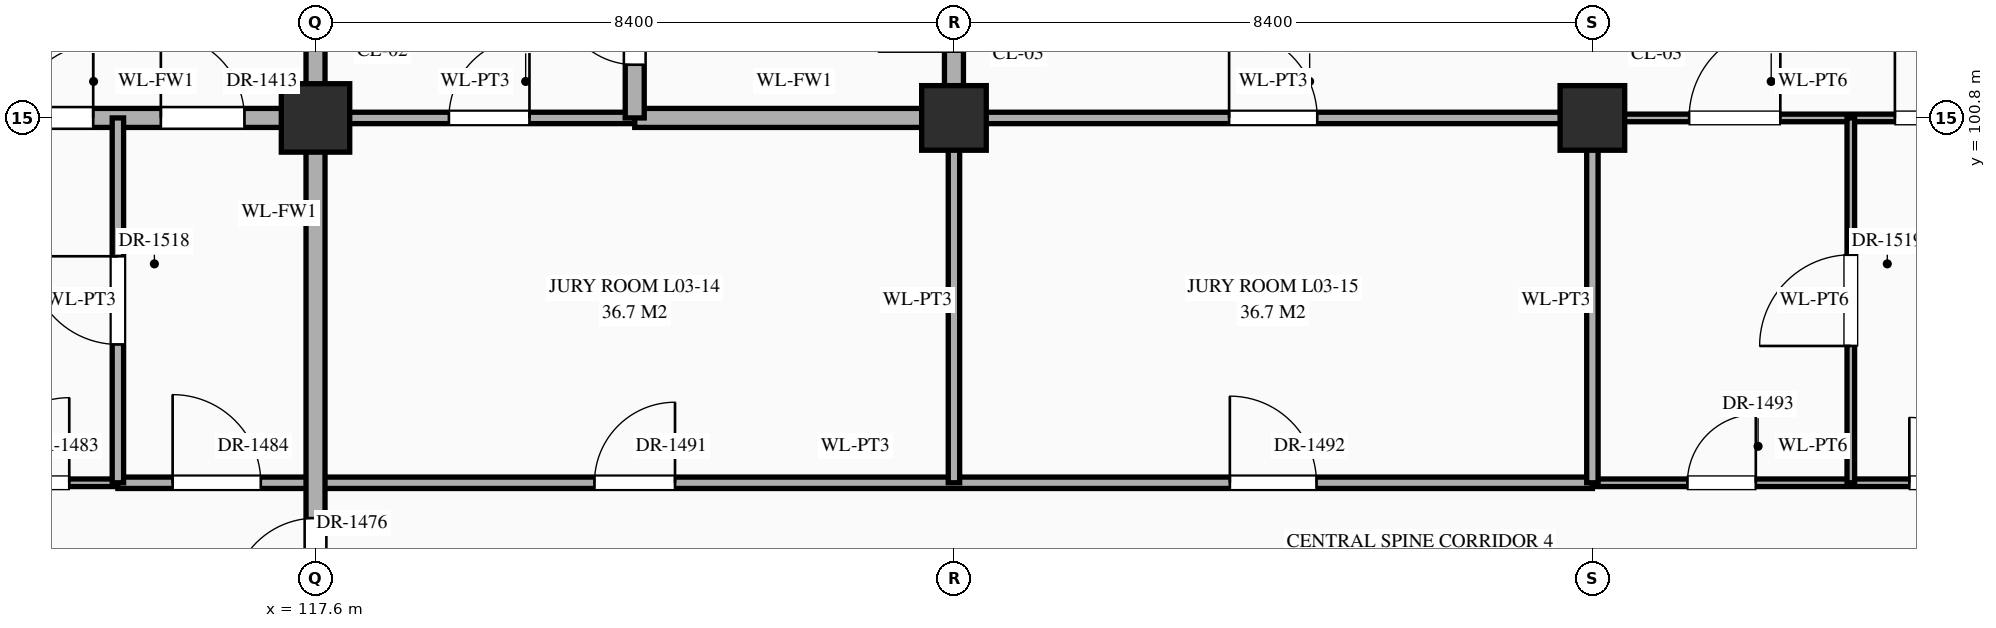
"""IFC4 building model, lengths in metres.
Left out: names, types, materials, properties, quantities, classifications, styles, units other than length and angle.
Written with IfcOpenShell. Run it as: python <this file> out.ifc"""

import sys

from ifc_helpers import new_model, si_unit, direction, frame, frame_2d, origin, origin_2d, place, context, subcontext, project, spatial, rectangle, extrude, element, fill, save


model = new_model("IFC4")
c1 = context("Model", 3, precision=1e-05, world=origin(), true_north=direction((0.0, 1.0)))
c2 = subcontext(c1, "Body", "Model", "MODEL_VIEW")
j1 = project(units=[si_unit("LENGTHUNIT", "METRE"), si_unit("PLANEANGLEUNIT", "RADIAN")], contexts=[c1])
p1 = place(None, origin())
s1 = spatial("IfcSite", under=j1, at=p1, CompositionType="ELEMENT")
p2 = place(p1, origin())
s2 = spatial("IfcBuilding", under=s1, at=p2, CompositionType="ELEMENT")
p3 = place(p2, frame((0.0, 0.0, 10.8)))
s3 = spatial("IfcBuildingStorey", under=s2, at=p3, CompositionType="ELEMENT", Elevation=10.8)
p4 = place(p3, frame((117.6, 100.8, 0.0), z_axis=(0.0, 0.0, 1.0), x_axis=(1.0, 0.0, 0.0)))
e1 = element("IfcColumn", 1, at=p4, inside=s3, PredefinedType="COLUMN", context=c2, shape_type="SweptSolid", body=[
    extrude(rectangle(XDim=0.9, YDim=0.9, at=origin_2d()), origin(), (0.0, 0.0, 1.0), 5.4),
])
for number, where, z_axis, x_axis in (
    (2, (126.0, 100.8, 0.0), (0.0, 0.0, 1.0), (1.0, 0.0, 0.0)),
    (3, (134.4, 100.8, 0.0), (0.0, 0.0, 1.0), (1.0, 0.0, 0.0)),
):
    element("IfcColumn", number, at=place(p3, frame(where, z_axis=z_axis, x_axis=x_axis)), inside=s3, PredefinedType="COLUMN", context=c2, shape_type="SweptSolid", body=[
        extrude(rectangle(XDim=0.85, YDim=0.85, at=origin_2d()), origin(), (0.0, 0.0, 1.0), 5.4),
    ])
p5 = place(p3, frame((109.2, 96.0, 0.0), z_axis=(0.0, 0.0, 1.0), x_axis=(1.0, 0.0, 0.0)))
e4 = element("IfcWall", 4, at=p5, inside=s3, PredefinedType="STANDARD", context=c2, shape_type="SweptSolid", body=[
    extrude(rectangle(XDim=5.8, YDim=0.1, at=frame_2d((2.9, 0.0))), origin(), (0.0, 0.0, 1.0), 5.12),
])
p6 = place(p5, frame((1.16, 0.0, 0.0)))
e5 = element("IfcOpeningElement", 5, at=p6, cuts=e4, PredefinedType="OPENING", context=c2, shape_type="SweptSolid", body=[
    extrude(rectangle(XDim=1.08, YDim=2.25, at=frame_2d((0.54, 1.125))), frame((0.0, 0.062, 0.0), z_axis=(0.0, -1.0, 0.0), x_axis=(1.0, 0.0, 0.0)), (0.0, 0.0, 1.0), 0.124),
])
p7 = place(p5, frame((4.04, 0.0, 0.0)))
e6 = element("IfcOpeningElement", 6, at=p7, cuts=e4, PredefinedType="OPENING", context=c2, shape_type="SweptSolid", body=[
    extrude(rectangle(XDim=1.12, YDim=2.25, at=frame_2d((0.56, 1.125))), frame((0.0, 0.062, 0.0), z_axis=(0.0, -1.0, 0.0), x_axis=(1.0, 0.0, 0.0)), (0.0, 0.0, 1.0), 0.124),
])
p8 = place(p3, frame((115.0, 96.0, 0.0), z_axis=(0.0, 0.0, 1.0), x_axis=(1.0, 0.0, 0.0)))
e7 = element("IfcWall", 7, at=p8, inside=s3, PredefinedType="STANDARD", context=c2, shape_type="SweptSolid", body=[
    extrude(rectangle(XDim=19.4, YDim=0.15, at=frame_2d((9.7, 0.0))), origin(), (0.0, 0.0, 1.0), 5.12),
])
p9 = place(p8, frame((0.72, 0.0, 0.0)))
e8 = element("IfcOpeningElement", 8, at=p9, cuts=e7, PredefinedType="OPENING", context=c2, shape_type="SweptSolid", body=[
    extrude(rectangle(XDim=1.16, YDim=2.3, at=frame_2d((0.58, 1.15))), frame((0.0, 0.087, 0.0), z_axis=(0.0, -1.0, 0.0), x_axis=(1.0, 0.0, 0.0)), (0.0, 0.0, 1.0), 0.174),
])
p10 = place(p8, frame((6.27, 0.0, 0.0)))
e9 = element("IfcOpeningElement", 9, at=p10, cuts=e7, PredefinedType="OPENING", context=c2, shape_type="SweptSolid", body=[
    extrude(rectangle(XDim=1.06, YDim=2.4, at=frame_2d((0.53, 1.2))), frame((0.0, 0.087, 0.0), z_axis=(0.0, -1.0, 0.0), x_axis=(1.0, 0.0, 0.0)), (0.0, 0.0, 1.0), 0.174),
])
p11 = place(p8, frame((14.63, 0.0, 0.0)))
e10 = element("IfcOpeningElement", 10, at=p11, cuts=e7, PredefinedType="OPENING", context=c2, shape_type="SweptSolid", body=[
    extrude(rectangle(XDim=1.14, YDim=2.4, at=frame_2d((0.57, 1.2))), frame((0.0, 0.087, 0.0), z_axis=(0.0, -1.0, 0.0), x_axis=(1.0, 0.0, 0.0)), (0.0, 0.0, 1.0), 0.174),
])
p12 = place(p3, frame((134.4, 96.0, 0.0), z_axis=(0.0, 0.0, 1.0), x_axis=(1.0, 0.0, 0.0)))
e11 = element("IfcWall", 11, at=p12, inside=s3, PredefinedType="STANDARD", context=c2, shape_type="SweptSolid", body=[
    extrude(rectangle(XDim=5.8, YDim=0.1, at=frame_2d((2.9, 0.0))), origin(), (0.0, 0.0, 1.0), 5.12),
])
p13 = place(p12, frame((1.25, 0.0, 0.0)))
e12 = element("IfcOpeningElement", 12, at=p13, cuts=e11, PredefinedType="OPENING", context=c2, shape_type="SweptSolid", body=[
    extrude(rectangle(XDim=0.9, YDim=2.15, at=frame_2d((0.45, 1.075))), frame((0.0, 0.062, 0.0), z_axis=(0.0, -1.0, 0.0), x_axis=(1.0, 0.0, 0.0)), (0.0, 0.0, 1.0), 0.124),
])
p14 = place(p12, frame((4.17, 0.0, 0.0)))
e13 = element("IfcOpeningElement", 13, at=p14, cuts=e11, PredefinedType="OPENING", context=c2, shape_type="SweptSolid", body=[
    extrude(rectangle(XDim=0.86, YDim=2.1, at=frame_2d((0.43, 1.05))), frame((0.0, 0.062, 0.0), z_axis=(0.0, -1.0, 0.0), x_axis=(1.0, 0.0, 0.0)), (0.0, 0.0, 1.0), 0.124),
])
p15 = place(p3, frame((113.4, 100.8, 0.0), z_axis=(0.0, 0.0, 1.0), x_axis=(1.0, 0.0, 0.0)))
e14 = element("IfcWall", 14, at=p15, inside=s3, PredefinedType="STANDARD", context=c2, shape_type="SweptSolid", body=[
    extrude(rectangle(XDim=4.2, YDim=0.25, at=frame_2d((2.1, 0.0))), origin(), (0.0, 0.0, 1.0), 4.27),
])
p16 = place(p15, frame((0.325, 0.0, 0.0)))
e15 = element("IfcOpeningElement", 15, at=p16, cuts=e14, PredefinedType="OPENING", context=c2, shape_type="SweptSolid", body=[
    extrude(rectangle(XDim=0.95, YDim=2.15, at=frame_2d((0.475, 1.075))), frame((0.0, 0.137, 0.0), z_axis=(0.0, -1.0, 0.0), x_axis=(1.0, 0.0, 0.0)), (0.0, 0.0, 1.0), 0.274),
])
p17 = place(p15, frame((2.165, 0.0, 0.0)))
e16 = element("IfcOpeningElement", 16, at=p17, cuts=e14, PredefinedType="OPENING", context=c2, shape_type="SweptSolid", body=[
    extrude(rectangle(XDim=1.1, YDim=2.2, at=frame_2d((0.55, 1.1))), frame((0.0, 0.137, 0.0), z_axis=(0.0, -1.0, 0.0), x_axis=(1.0, 0.0, 0.0)), (0.0, 0.0, 1.0), 0.274),
])
p18 = place(p3, frame((117.6, 100.8, 0.0), z_axis=(0.0, 0.0, 1.0), x_axis=(1.0, 0.0, 0.0)))
e17 = element("IfcWall", 17, at=p18, inside=s3, PredefinedType="STANDARD", context=c2, shape_type="SweptSolid", body=[
    extrude(rectangle(XDim=4.2, YDim=0.15, at=frame_2d((2.1, 0.0))), origin(), (0.0, 0.0, 1.0), 4.27),
])
p19 = place(p18, frame((1.755, 0.0, 0.0)))
e18 = element("IfcOpeningElement", 18, at=p19, cuts=e17, PredefinedType="OPENING", context=c2, shape_type="SweptSolid", body=[
    extrude(rectangle(XDim=1.06, YDim=2.4, at=frame_2d((0.53, 1.2))), frame((0.0, 0.087, 0.0), z_axis=(0.0, -1.0, 0.0), x_axis=(1.0, 0.0, 0.0)), (0.0, 0.0, 1.0), 0.174),
])
p20 = place(p3, frame((121.8, 100.8, 0.0), z_axis=(0.0, 0.0, 1.0), x_axis=(1.0, 0.0, 0.0)))
e19 = element("IfcWall", 19, at=p20, inside=s3, PredefinedType="STANDARD", context=c2, shape_type="SweptSolid", body=[
    extrude(rectangle(XDim=4.2, YDim=0.25, at=frame_2d((2.1, 0.0))), origin(), (0.0, 0.0, 1.0), 4.27),
])
p21 = place(p3, frame((126.0, 100.8, 0.0), z_axis=(0.0, 0.0, 1.0), x_axis=(1.0, 0.0, 0.0)))
e20 = element("IfcWall", 20, at=p21, inside=s3, PredefinedType="STANDARD", context=c2, shape_type="SweptSolid", body=[
    extrude(rectangle(XDim=8.4, YDim=0.15, at=frame_2d((4.2, 0.0))), origin(), (0.0, 0.0, 1.0), 4.27),
])
p22 = place(p21, frame((3.62, 0.0, 0.0)))
e21 = element("IfcOpeningElement", 21, at=p22, cuts=e20, PredefinedType="OPENING", context=c2, shape_type="SweptSolid", body=[
    extrude(rectangle(XDim=1.16, YDim=2.3, at=frame_2d((0.58, 1.15))), frame((0.0, 0.087, 0.0), z_axis=(0.0, -1.0, 0.0), x_axis=(1.0, 0.0, 0.0)), (0.0, 0.0, 1.0), 0.174),
])
p23 = place(p3, frame((134.4, 100.8, 0.0), z_axis=(0.0, 0.0, 1.0), x_axis=(1.0, 0.0, 0.0)))
e22 = element("IfcWall", 22, at=p23, inside=s3, PredefinedType="STANDARD", context=c2, shape_type="SweptSolid", body=[
    extrude(rectangle(XDim=5.8, YDim=0.1, at=frame_2d((2.9, 0.0))), origin(), (0.0, 0.0, 1.0), 4.27),
])
p24 = place(p23, frame((1.272, 0.0, 0.0)))
e23 = element("IfcOpeningElement", 23, at=p24, cuts=e22, PredefinedType="OPENING", context=c2, shape_type="SweptSolid", body=[
    extrude(rectangle(XDim=1.2, YDim=2.35, at=frame_2d((0.6, 1.175))), frame((0.0, 0.062, 0.0), z_axis=(0.0, -1.0, 0.0), x_axis=(1.0, 0.0, 0.0)), (0.0, 0.0, 1.0), 0.124),
])
p25 = place(p23, frame((3.98, 0.0, 0.0)))
e24 = element("IfcOpeningElement", 24, at=p25, cuts=e22, PredefinedType="OPENING", context=c2, shape_type="SweptSolid", body=[
    extrude(rectangle(XDim=1.24, YDim=2.3, at=frame_2d((0.62, 1.15))), frame((0.0, 0.062, 0.0), z_axis=(0.0, -1.0, 0.0), x_axis=(1.0, 0.0, 0.0)), (0.0, 0.0, 1.0), 0.124),
])
p26 = place(p3, frame((115.0, 96.0, 0.0), z_axis=(0.0, 0.0, 1.0), x_axis=(0.0, 1.0, 0.0)))
e25 = element("IfcWall", 25, at=p26, inside=s3, PredefinedType="STANDARD", context=c2, shape_type="SweptSolid", body=[
    extrude(rectangle(XDim=4.8, YDim=0.15, at=frame_2d((2.4, 0.0))), origin(), (0.0, 0.0, 1.0), 5.12),
])
p27 = place(p26, frame((1.82, 0.0, 0.0)))
e26 = element("IfcOpeningElement", 26, at=p27, cuts=e25, PredefinedType="OPENING", context=c2, shape_type="SweptSolid", body=[
    extrude(rectangle(XDim=1.16, YDim=2.3, at=frame_2d((0.58, 1.15))), frame((0.0, 0.087, 0.0), z_axis=(0.0, -1.0, 0.0), x_axis=(1.0, 0.0, 0.0)), (0.0, 0.0, 1.0), 0.174),
])
p28 = place(p3, frame((117.6, 91.2, 0.0), z_axis=(0.0, 0.0, 1.0), x_axis=(0.0, 1.0, 0.0)))
e27 = element("IfcWall", 27, at=p28, inside=s3, PredefinedType="STANDARD", context=c2, shape_type="SweptSolid", body=[
    extrude(rectangle(XDim=13.2, YDim=0.25, at=frame_2d((6.6, 0.0))), origin(), (0.0, 0.0, 1.0), 4.37),
])
p29 = place(p28, frame((0.54, 0.0, 0.0)))
e28 = element("IfcOpeningElement", 28, at=p29, cuts=e27, PredefinedType="OPENING", context=c2, shape_type="SweptSolid", body=[
    extrude(rectangle(XDim=0.95, YDim=2.15, at=frame_2d((0.475, 1.075))), frame((0.0, 0.137, 0.0), z_axis=(0.0, -1.0, 0.0), x_axis=(1.0, 0.0, 0.0)), (0.0, 0.0, 1.0), 0.274),
])
p30 = place(p28, frame((10.51, 0.0, 0.0)))
e29 = element("IfcOpeningElement", 29, at=p30, cuts=e27, PredefinedType="OPENING", context=c2, shape_type="SweptSolid", body=[
    extrude(rectangle(XDim=0.95, YDim=2.15, at=frame_2d((0.475, 1.075))), frame((0.0, 0.137, 0.0), z_axis=(0.0, -1.0, 0.0), x_axis=(1.0, 0.0, 0.0)), (0.0, 0.0, 1.0), 0.274),
])
p31 = place(p28, frame((3.235, 0.0, 0.0)))
e30 = element("IfcOpeningElement", 30, at=p31, cuts=e27, PredefinedType="OPENING", context=c2, shape_type="SweptSolid", body=[
    extrude(rectangle(XDim=1.1, YDim=2.2, at=frame_2d((0.55, 1.1))), frame((0.0, 0.137, 0.0), z_axis=(0.0, -1.0, 0.0), x_axis=(1.0, 0.0, 0.0)), (0.0, 0.0, 1.0), 0.274),
])
p32 = place(p3, frame((121.8, 100.8, 0.0), z_axis=(0.0, 0.0, 1.0), x_axis=(0.0, 1.0, 0.0)))
e31 = element("IfcWall", 31, at=p32, inside=s3, PredefinedType="STANDARD", context=c2, shape_type="SweptSolid", body=[
    extrude(rectangle(XDim=3.6, YDim=0.25, at=frame_2d((1.8, 0.0))), origin(), (0.0, 0.0, 1.0), 4.72),
])
p33 = place(p32, frame((0.7, 0.0, 0.0)))
e32 = element("IfcOpeningElement", 32, at=p33, cuts=e31, PredefinedType="OPENING", context=c2, shape_type="SweptSolid", body=[
    extrude(rectangle(XDim=1.0, YDim=2.2, at=frame_2d((0.5, 1.1))), frame((0.0, 0.137, 0.0), z_axis=(0.0, -1.0, 0.0), x_axis=(1.0, 0.0, 0.0)), (0.0, 0.0, 1.0), 0.274),
])
p34 = place(p3, frame((126.0, 96.0, 0.0), z_axis=(0.0, 0.0, 1.0), x_axis=(0.0, 1.0, 0.0)))
e33 = element("IfcWall", 33, at=p34, inside=s3, PredefinedType="STANDARD", context=c2, shape_type="SweptSolid", body=[
    extrude(rectangle(XDim=4.8, YDim=0.15, at=frame_2d((2.4, 0.0))), origin(), (0.0, 0.0, 1.0), 4.37),
])
p35 = place(p3, frame((126.0, 100.8, 0.0), z_axis=(0.0, 0.0, 1.0), x_axis=(0.0, 1.0, 0.0)))
e34 = element("IfcWall", 34, at=p35, inside=s3, PredefinedType="STANDARD", context=c2, shape_type="SweptSolid", body=[
    extrude(rectangle(XDim=3.6, YDim=0.25, at=frame_2d((1.8, 0.0))), origin(), (0.0, 0.0, 1.0), 4.37),
])
p36 = place(p35, frame((0.873, 0.0, 0.0)))
e35 = element("IfcOpeningElement", 35, at=p36, cuts=e34, PredefinedType="OPENING", context=c2, shape_type="SweptSolid", body=[
    extrude(rectangle(XDim=1.0, YDim=2.2, at=frame_2d((0.5, 1.1))), frame((0.0, 0.137, 0.0), z_axis=(0.0, -1.0, 0.0), x_axis=(1.0, 0.0, 0.0)), (0.0, 0.0, 1.0), 0.274),
])
p37 = place(p3, frame((134.4, 96.0, 0.0), z_axis=(0.0, 0.0, 1.0), x_axis=(0.0, 1.0, 0.0)))
e36 = element("IfcWall", 36, at=p37, inside=s3, PredefinedType="STANDARD", context=c2, shape_type="SweptSolid", body=[
    extrude(rectangle(XDim=4.8, YDim=0.15, at=frame_2d((2.4, 0.0))), origin(), (0.0, 0.0, 1.0), 4.37),
])
p38 = place(p3, frame((137.8, 96.0, 0.0), z_axis=(0.0, 0.0, 1.0), x_axis=(0.0, 1.0, 0.0)))
e37 = element("IfcWall", 37, at=p38, inside=s3, PredefinedType="STANDARD", context=c2, shape_type="SweptSolid", body=[
    extrude(rectangle(XDim=4.8, YDim=0.1, at=frame_2d((2.4, 0.0))), origin(), (0.0, 0.0, 1.0), 5.12),
])
p39 = place(p38, frame((1.8, 0.0, 0.0)))
e38 = element("IfcOpeningElement", 38, at=p39, cuts=e37, PredefinedType="OPENING", context=c2, shape_type="SweptSolid", body=[
    extrude(rectangle(XDim=1.2, YDim=2.35, at=frame_2d((0.6, 1.175))), frame((0.0, 0.062, 0.0), z_axis=(0.0, -1.0, 0.0), x_axis=(1.0, 0.0, 0.0)), (0.0, 0.0, 1.0), 0.124),
])
p40 = place(p33, origin())
e39 = element("IfcDoor", 39, at=p40, inside=s3, OperationType="SINGLE_SWING_RIGHT", PredefinedType="DOOR", context=c2, shape_type="SweptSolid", body=[
    extrude(rectangle(XDim=1.0, YDim=2.2, at=frame_2d((0.5, 1.1))), frame((0.0, 0.025, 0.0), z_axis=(0.0, -1.0, 0.0), x_axis=(1.0, 0.0, 0.0)), (0.0, 0.0, 1.0), 0.05),
])
fill(e32, e39)
p41 = place(p19, origin())
e40 = element("IfcDoor", 40, at=p41, inside=s3, OperationType="SINGLE_SWING_RIGHT", PredefinedType="DOOR", context=c2, shape_type="SweptSolid", body=[
    extrude(rectangle(XDim=1.06, YDim=2.4, at=frame_2d((0.53, 1.2))), frame((0.0, 0.025, 0.0), z_axis=(0.0, -1.0, 0.0), x_axis=(1.0, 0.0, 0.0)), (0.0, 0.0, 1.0), 0.05),
])
fill(e18, e40)
p42 = place(p16, origin())
e41 = element("IfcDoor", 41, at=p42, inside=s3, OperationType="SINGLE_SWING_RIGHT", PredefinedType="DOOR", context=c2, shape_type="SweptSolid", body=[
    extrude(rectangle(XDim=0.95, YDim=2.15, at=frame_2d((0.475, 1.075))), frame((0.0, 0.025, 0.0), z_axis=(0.0, -1.0, 0.0), x_axis=(1.0, 0.0, 0.0)), (0.0, 0.0, 1.0), 0.05),
])
fill(e15, e41)
p43 = place(p17, origin())
e42 = element("IfcDoor", 42, at=p43, inside=s3, OperationType="SINGLE_SWING_LEFT", PredefinedType="DOOR", context=c2, shape_type="SweptSolid", body=[
    extrude(rectangle(XDim=1.1, YDim=2.2, at=frame_2d((0.55, 1.1))), frame((0.0, 0.025, 0.0), z_axis=(0.0, -1.0, 0.0), x_axis=(1.0, 0.0, 0.0)), (0.0, 0.0, 1.0), 0.05),
])
fill(e16, e42)
p44 = place(p22, origin())
e43 = element("IfcDoor", 43, at=p44, inside=s3, OperationType="SINGLE_SWING_LEFT", PredefinedType="DOOR", context=c2, shape_type="SweptSolid", body=[
    extrude(rectangle(XDim=1.16, YDim=2.3, at=frame_2d((0.58, 1.15))), frame((0.0, 0.025, 0.0), z_axis=(0.0, -1.0, 0.0), x_axis=(1.0, 0.0, 0.0)), (0.0, 0.0, 1.0), 0.05),
])
fill(e21, e43)
p45 = place(p24, origin())
e44 = element("IfcDoor", 44, at=p45, inside=s3, OperationType="SINGLE_SWING_RIGHT", PredefinedType="DOOR", context=c2, shape_type="SweptSolid", body=[
    extrude(rectangle(XDim=1.2, YDim=2.35, at=frame_2d((0.6, 1.175))), frame((0.0, 0.025, 0.0), z_axis=(0.0, -1.0, 0.0), x_axis=(1.0, 0.0, 0.0)), (0.0, 0.0, 1.0), 0.05),
])
fill(e23, e44)
p46 = place(p25, origin())
e45 = element("IfcDoor", 45, at=p46, inside=s3, OperationType="SINGLE_SWING_LEFT", PredefinedType="DOOR", context=c2, shape_type="SweptSolid", body=[
    extrude(rectangle(XDim=1.24, YDim=2.3, at=frame_2d((0.62, 1.15))), frame((0.0, 0.025, 0.0), z_axis=(0.0, -1.0, 0.0), x_axis=(1.0, 0.0, 0.0)), (0.0, 0.0, 1.0), 0.05),
])
fill(e24, e45)
p47 = place(p31, origin())
e46 = element("IfcDoor", 46, at=p47, inside=s3, OperationType="SINGLE_SWING_LEFT", PredefinedType="DOOR", context=c2, shape_type="SweptSolid", body=[
    extrude(rectangle(XDim=1.1, YDim=2.2, at=frame_2d((0.55, 1.1))), frame((0.0, 0.025, 0.0), z_axis=(0.0, -1.0, 0.0), x_axis=(1.0, 0.0, 0.0)), (0.0, 0.0, 1.0), 0.05),
])
fill(e30, e46)
p48 = place(p7, origin())
e47 = element("IfcDoor", 47, at=p48, inside=s3, OperationType="SINGLE_SWING_RIGHT", PredefinedType="DOOR", context=c2, shape_type="SweptSolid", body=[
    extrude(rectangle(XDim=1.12, YDim=2.25, at=frame_2d((0.56, 1.125))), frame((0.0, 0.025, 0.0), z_axis=(0.0, -1.0, 0.0), x_axis=(1.0, 0.0, 0.0)), (0.0, 0.0, 1.0), 0.05),
])
fill(e6, e47)
p49 = place(p9, origin())
e48 = element("IfcDoor", 48, at=p49, inside=s3, OperationType="SINGLE_SWING_LEFT", PredefinedType="DOOR", context=c2, shape_type="SweptSolid", body=[
    extrude(rectangle(XDim=1.16, YDim=2.3, at=frame_2d((0.58, 1.15))), frame((0.0, 0.025, 0.0), z_axis=(0.0, -1.0, 0.0), x_axis=(1.0, 0.0, 0.0)), (0.0, 0.0, 1.0), 0.05),
])
fill(e8, e48)
p50 = place(p10, origin())
e49 = element("IfcDoor", 49, at=p50, inside=s3, OperationType="SINGLE_SWING_RIGHT", PredefinedType="DOOR", context=c2, shape_type="SweptSolid", body=[
    extrude(rectangle(XDim=1.06, YDim=2.4, at=frame_2d((0.53, 1.2))), frame((0.0, 0.025, 0.0), z_axis=(0.0, -1.0, 0.0), x_axis=(1.0, 0.0, 0.0)), (0.0, 0.0, 1.0), 0.05),
])
fill(e9, e49)
p51 = place(p11, origin())
e50 = element("IfcDoor", 50, at=p51, inside=s3, OperationType="SINGLE_SWING_LEFT", PredefinedType="DOOR", context=c2, shape_type="SweptSolid", body=[
    extrude(rectangle(XDim=1.14, YDim=2.4, at=frame_2d((0.57, 1.2))), frame((0.0, 0.025, 0.0), z_axis=(0.0, -1.0, 0.0), x_axis=(1.0, 0.0, 0.0)), (0.0, 0.0, 1.0), 0.05),
])
fill(e10, e50)
p52 = place(p13, origin())
e51 = element("IfcDoor", 51, at=p52, inside=s3, OperationType="SINGLE_SWING_RIGHT", PredefinedType="DOOR", context=c2, shape_type="SweptSolid", body=[
    extrude(rectangle(XDim=0.9, YDim=2.15, at=frame_2d((0.45, 1.075))), frame((0.0, 0.025, 0.0), z_axis=(0.0, -1.0, 0.0), x_axis=(1.0, 0.0, 0.0)), (0.0, 0.0, 1.0), 0.05),
])
fill(e12, e51)
p53 = place(p14, origin())
e52 = element("IfcDoor", 52, at=p53, inside=s3, OperationType="SINGLE_SWING_LEFT", PredefinedType="DOOR", context=c2, shape_type="SweptSolid", body=[
    extrude(rectangle(XDim=0.86, YDim=2.1, at=frame_2d((0.43, 1.05))), frame((0.0, 0.025, 0.0), z_axis=(0.0, -1.0, 0.0), x_axis=(1.0, 0.0, 0.0)), (0.0, 0.0, 1.0), 0.05),
])
fill(e13, e52)
p54 = place(p27, origin())
e53 = element("IfcDoor", 53, at=p54, inside=s3, OperationType="SINGLE_SWING_RIGHT", PredefinedType="DOOR", context=c2, shape_type="SweptSolid", body=[
    extrude(rectangle(XDim=1.16, YDim=2.3, at=frame_2d((0.58, 1.15))), frame((0.0, 0.025, 0.0), z_axis=(0.0, -1.0, 0.0), x_axis=(1.0, 0.0, 0.0)), (0.0, 0.0, 1.0), 0.05),
])
fill(e26, e53)
p55 = place(p39, origin())
e54 = element("IfcDoor", 54, at=p55, inside=s3, OperationType="SINGLE_SWING_LEFT", PredefinedType="DOOR", context=c2, shape_type="SweptSolid", body=[
    extrude(rectangle(XDim=1.2, YDim=2.35, at=frame_2d((0.6, 1.175))), frame((0.0, 0.025, 0.0), z_axis=(0.0, -1.0, 0.0), x_axis=(1.0, 0.0, 0.0)), (0.0, 0.0, 1.0), 0.05),
])
fill(e38, e54)
save(model, sys.argv[1])
